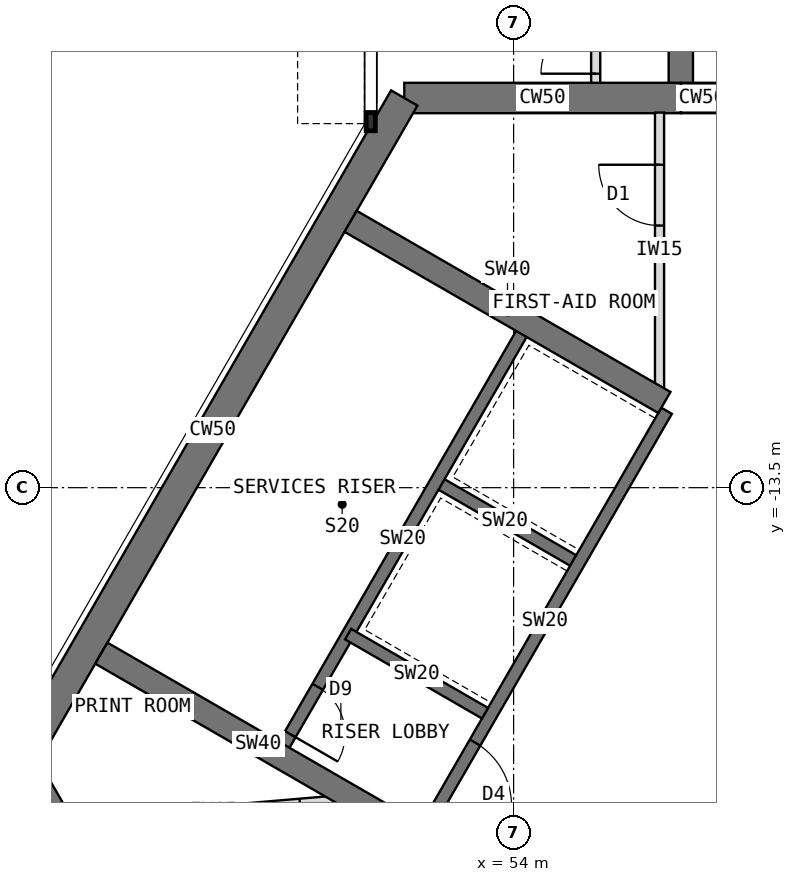
"""IFC4 building model, lengths in metres.
Left out: names, types, materials, properties, quantities, classifications, styles, units other than length and angle.
Written with IfcOpenShell. Run it as: python <this file> out.ifc"""

import sys

from ifc_helpers import new_model, si_unit, direction, frame, frame_2d, origin, place, context, subcontext, project, spatial, rectangle, extrude, element, fill, save


model = new_model("IFC4")
c1 = context("Model", 3, precision=1e-05, world=origin(), true_north=direction((0.0, 1.0)))
c2 = subcontext(c1, "Body", "Model", "MODEL_VIEW")
j1 = project(units=[si_unit("LENGTHUNIT", "METRE"), si_unit("PLANEANGLEUNIT", "RADIAN")], contexts=[c1])
p1 = place(None, origin())
s1 = spatial("IfcSite", under=j1, at=p1, CompositionType="ELEMENT")
p2 = place(p1, origin())
s2 = spatial("IfcBuilding", under=s1, at=p2, CompositionType="ELEMENT")
p3 = place(p2, frame((0.0, 0.0, 206.5)))
s3 = spatial("IfcBuildingStorey", under=s2, at=p3, CompositionType="ELEMENT", Elevation=206.5)
p4 = place(p3, frame((60.25, -7.092, 0.0), z_axis=(0.0, 0.0, 1.0), x_axis=(-1.0, 0.0, 0.0)))
e1 = element("IfcWall", 1, at=p4, inside=s3, PredefinedType="SHEAR", context=c2, shape_type="SweptSolid", body=[
    extrude(rectangle(XDim=3.5, YDim=0.5, at=frame_2d((1.75, 0.0))), origin(), (0.0, 0.0, 1.0), 4.0),
])
p5 = place(p4, frame((0.85, 0.0, 0.0)))
e2 = element("IfcOpeningElement", 2, at=p5, cuts=e1, PredefinedType="OPENING", context=c2, shape_type="SweptSolid", body=[
    extrude(rectangle(XDim=1.8, YDim=2.1, at=frame_2d((0.9, 1.05))), frame((0.0, 0.26, 0.0), z_axis=(0.0, -1.0, 0.0), x_axis=(1.0, 0.0, 0.0)), (0.0, 0.0, 1.0), 0.52),
])
p6 = place(p3, frame((56.75, -7.092, 0.0), z_axis=(0.0, 0.0, 1.0), x_axis=(-1.0, 0.0, 0.0)))
e3 = element("IfcWall", 3, at=p6, inside=s3, PredefinedType="SHEAR", context=c2, shape_type="SweptSolid", body=[
    extrude(rectangle(XDim=4.548, YDim=0.5, at=frame_2d((2.274, 0.0))), origin(), (0.0, 0.0, 1.0), 4.0),
])
p7 = place(p3, frame((52.202, -7.092, 0.0), z_axis=(0.0, 0.0, 1.0), x_axis=(-0.500005998175, -0.866021940709, 0.0)))
e4 = element("IfcWall", 4, at=p7, inside=s3, PredefinedType="SHEAR", context=c2, shape_type="SweptSolid", body=[
    extrude(rectangle(XDim=12.596, YDim=0.5, at=frame_2d((6.298, 0.0))), origin(), (0.0, 0.0, 1.0), 4.0),
])
p8 = place(p3, frame((45.904, -18.0, 0.0), z_axis=(0.0, 0.0, 1.0), x_axis=(0.500024481964, -0.866011268655, 0.0)))
e5 = element("IfcWall", 5, at=p8, inside=s3, PredefinedType="SHEAR", context=c2, shape_type="SweptSolid", body=[
    extrude(rectangle(XDim=4.548, YDim=0.5, at=frame_2d((2.274, 0.0))), origin(), (0.0, 0.0, 1.0), 4.0),
])
p9 = place(p3, frame((56.75, -7.092, 0.0), z_axis=(0.0, 0.0, 1.0), x_axis=(0.0, 1.0, 0.0)))
e6 = element("IfcWall", 6, at=p9, inside=s3, PredefinedType="SHEAR", context=c2, shape_type="SweptSolid", body=[
    extrude(rectangle(XDim=2.592, YDim=0.4, at=frame_2d((1.296, 0.0))), origin(), (0.0, 0.0, 1.0), 4.0),
])
p10 = place(p3, frame((56.516, -12.236, 0.0), z_axis=(0.0, 0.0, 1.0), x_axis=(-0.49999894854, -0.866026010844, 0.0)))
e7 = element("IfcWall", 7, at=p10, inside=s3, PredefinedType="SHEAR", context=c2, shape_type="SweptSolid", body=[
    extrude(rectangle(XDim=8.0, YDim=0.2, at=frame_2d((4.0, 0.0))), origin(), (0.0, 0.0, 1.0), 4.0),
])
p11 = place(p10, frame((6.3, 0.0, 0.0)))
e8 = element("IfcOpeningElement", 8, at=p11, cuts=e7, PredefinedType="OPENING", context=c2, shape_type="SweptSolid", body=[
    extrude(rectangle(XDim=1.2, YDim=2.1, at=frame_2d((0.6, 1.05))), frame((0.0, 0.11, 0.0), z_axis=(0.0, -1.0, 0.0), x_axis=(1.0, 0.0, 0.0)), (0.0, 0.0, 1.0), 0.22),
])
for number, where, z_axis, x_axis in (
    (9, (54.98, -14.697, 0.0), (0.0, 0.0, 1.0), (-0.866, 0.5, 0.0)),
    (10, (53.53, -17.209, 0.0), (0.0, 0.0, 1.0), (-0.866, 0.5, 0.0)),
):
    element("IfcWall", number, at=place(p3, frame(where, z_axis=z_axis, x_axis=x_axis)), inside=s3, PredefinedType="SHEAR", context=c2, shape_type="SweptSolid", body=[
        extrude(rectangle(XDim=2.6, YDim=0.2, at=frame_2d((1.3, 0.0))), origin(), (0.0, 0.0, 1.0), 4.0),
    ])
p12 = place(p3, frame((54.178, -10.886, 0.0), z_axis=(0.0, 0.0, 1.0), x_axis=(-0.49999894854, -0.866026010844, 0.0)))
e11 = element("IfcWall", 11, at=p12, inside=s3, PredefinedType="SHEAR", context=c2, shape_type="SweptSolid", body=[
    extrude(rectangle(XDim=8.0, YDim=0.2, at=frame_2d((4.0, 0.0))), origin(), (0.0, 0.0, 1.0), 4.0),
])
p13 = place(p12, frame((6.8, 0.0, 0.0)))
e12 = element("IfcOpeningElement", 12, at=p13, cuts=e11, PredefinedType="OPENING", context=c2, shape_type="SweptSolid", body=[
    extrude(rectangle(XDim=0.9, YDim=2.1, at=frame_2d((0.45, 1.05))), frame((0.0, 0.11, 0.0), z_axis=(0.0, -1.0, 0.0), x_axis=(1.0, 0.0, 0.0)), (0.0, 0.0, 1.0), 0.22),
])
p14 = place(p3, frame((52.38, -19.201, 0.0), z_axis=(0.0, 0.0, 1.0), x_axis=(-0.866012946976, 0.500021575205, 0.0)))
e13 = element("IfcWall", 13, at=p14, inside=s3, PredefinedType="SHEAR", context=c2, shape_type="SweptSolid", body=[
    extrude(rectangle(XDim=5.958, YDim=0.4, at=frame_2d((2.979, 0.0))), origin(), (0.0, 0.0, 1.0), 4.0),
])
p15 = place(p3, frame((56.48, -12.099, 0.0), z_axis=(0.0, 0.0, 1.0), x_axis=(-0.86602319114, 0.500003832394, 0.0)))
e14 = element("IfcWall", 14, at=p15, inside=s3, PredefinedType="SHEAR", context=c2, shape_type="SweptSolid", body=[
    extrude(rectangle(XDim=5.958, YDim=0.4, at=frame_2d((2.979, 0.0))), origin(), (0.0, 0.0, 1.0), 4.0),
])
p16 = place(p3, frame((55.35, -6.842, 0.0), z_axis=(0.0, 0.0, 1.0), x_axis=(0.0, 1.0, 0.0)))
e15 = element("IfcWall", 15, at=p16, inside=s3, PredefinedType="PARTITIONING", context=c2, shape_type="SweptSolid", body=[
    extrude(rectangle(XDim=2.4, YDim=0.15, at=frame_2d((1.2, 0.0))), origin(), (0.0, 0.0, 1.0), 3.8),
])
p17 = place(p16, frame((0.15, 0.0, 0.0)))
e16 = element("IfcOpeningElement", 16, at=p17, cuts=e15, PredefinedType="OPENING", context=c2, shape_type="SweptSolid", body=[
    extrude(rectangle(XDim=0.9, YDim=2.1, at=frame_2d((0.45, 1.05))), frame((0.0, 0.085, 0.0), z_axis=(0.0, -1.0, 0.0), x_axis=(1.0, 0.0, 0.0)), (0.0, 0.0, 1.0), 0.17),
])
p18 = place(p3, frame((56.4, -11.857, 0.0), z_axis=(0.0, 0.0, 1.0), x_axis=(0.0, 1.0, 0.0)))
e17 = element("IfcWall", 17, at=p18, inside=s3, PredefinedType="PARTITIONING", context=c2, shape_type="SweptSolid", body=[
    extrude(rectangle(XDim=4.526, YDim=0.15, at=frame_2d((2.263, 0.0))), origin(), (0.0, 0.0, 1.0), 3.8),
])
p19 = place(p18, frame((2.668, 0.0, 0.0)))
e18 = element("IfcOpeningElement", 18, at=p19, cuts=e17, PredefinedType="OPENING", context=c2, shape_type="SweptSolid", body=[
    extrude(rectangle(XDim=1.0, YDim=2.1, at=frame_2d((0.5, 1.05))), frame((0.0, 0.085, 0.0), z_axis=(0.0, -1.0, 0.0), x_axis=(1.0, 0.0, 0.0)), (0.0, 0.0, 1.0), 0.17),
])
p20 = place(p3, frame((51.364, -18.614, 0.0), z_axis=(0.0, 0.0, 1.0), x_axis=(-0.996314617181, -0.085774026317, 0.0)))
e19 = element("IfcWall", 19, at=p20, inside=s3, PredefinedType="PARTITIONING", context=c2, shape_type="SweptSolid", body=[
    extrude(rectangle(XDim=4.605, YDim=0.15, at=frame_2d((2.303, 0.0))), origin(), (0.0, 0.0, 1.0), 3.8),
])
p21 = place(p20, frame((0.882, 0.0, 0.0)))
e20 = element("IfcOpeningElement", 20, at=p21, cuts=e19, PredefinedType="OPENING", context=c2, shape_type="SweptSolid", body=[
    extrude(rectangle(XDim=1.0, YDim=2.1, at=frame_2d((0.5, 1.05))), frame((0.0, 0.085, 0.0), z_axis=(0.0, -1.0, 0.0), x_axis=(1.0, 0.0, 0.0)), (0.0, 0.0, 1.0), 0.17),
])
p22 = place(p11, origin())
e21 = element("IfcDoor", 21, at=p22, inside=s3, OperationType="SINGLE_SWING_RIGHT", PredefinedType="DOOR", context=c2, shape_type="SweptSolid", body=[
    extrude(rectangle(XDim=1.2, YDim=2.1, at=frame_2d((0.6, 1.05))), frame((0.0, 0.025, 0.0), z_axis=(0.0, -1.0, 0.0), x_axis=(1.0, 0.0, 0.0)), (0.0, 0.0, 1.0), 0.05),
])
fill(e8, e21)
p23 = place(p13, origin())
e22 = element("IfcDoor", 22, at=p23, inside=s3, OperationType="SINGLE_SWING_RIGHT", PredefinedType="DOOR", context=c2, shape_type="SweptSolid", body=[
    extrude(rectangle(XDim=0.9, YDim=2.1, at=frame_2d((0.45, 1.05))), frame((0.0, 0.025, 0.0), z_axis=(0.0, -1.0, 0.0), x_axis=(1.0, 0.0, 0.0)), (0.0, 0.0, 1.0), 0.05),
])
fill(e12, e22)
p24 = place(p17, origin())
e23 = element("IfcDoor", 23, at=p24, inside=s3, OperationType="SINGLE_SWING_LEFT", PredefinedType="DOOR", context=c2, shape_type="SweptSolid", body=[
    extrude(rectangle(XDim=0.9, YDim=2.1, at=frame_2d((0.45, 1.05))), frame((0.0, 0.025, 0.0), z_axis=(0.0, -1.0, 0.0), x_axis=(1.0, 0.0, 0.0)), (0.0, 0.0, 1.0), 0.05),
])
fill(e16, e23)
p25 = place(p21, origin())
e24 = element("IfcDoor", 24, at=p25, inside=s3, OperationType="SINGLE_SWING_LEFT", PredefinedType="DOOR", context=c2, shape_type="SweptSolid", body=[
    extrude(rectangle(XDim=1.0, YDim=2.1, at=frame_2d((0.5, 1.05))), frame((0.0, 0.025, 0.0), z_axis=(0.0, -1.0, 0.0), x_axis=(1.0, 0.0, 0.0)), (0.0, 0.0, 1.0), 0.05),
])
fill(e20, e24)
p26 = place(p19, origin())
e25 = element("IfcDoor", 25, at=p26, inside=s3, OperationType="SINGLE_SWING_RIGHT", PredefinedType="DOOR", context=c2, shape_type="SweptSolid", body=[
    extrude(rectangle(XDim=1.0, YDim=2.1, at=frame_2d((0.5, 1.05))), frame((0.0, 0.025, 0.0), z_axis=(0.0, -1.0, 0.0), x_axis=(1.0, 0.0, 0.0)), (0.0, 0.0, 1.0), 0.05),
])
fill(e18, e25)
save(model, sys.argv[1])
